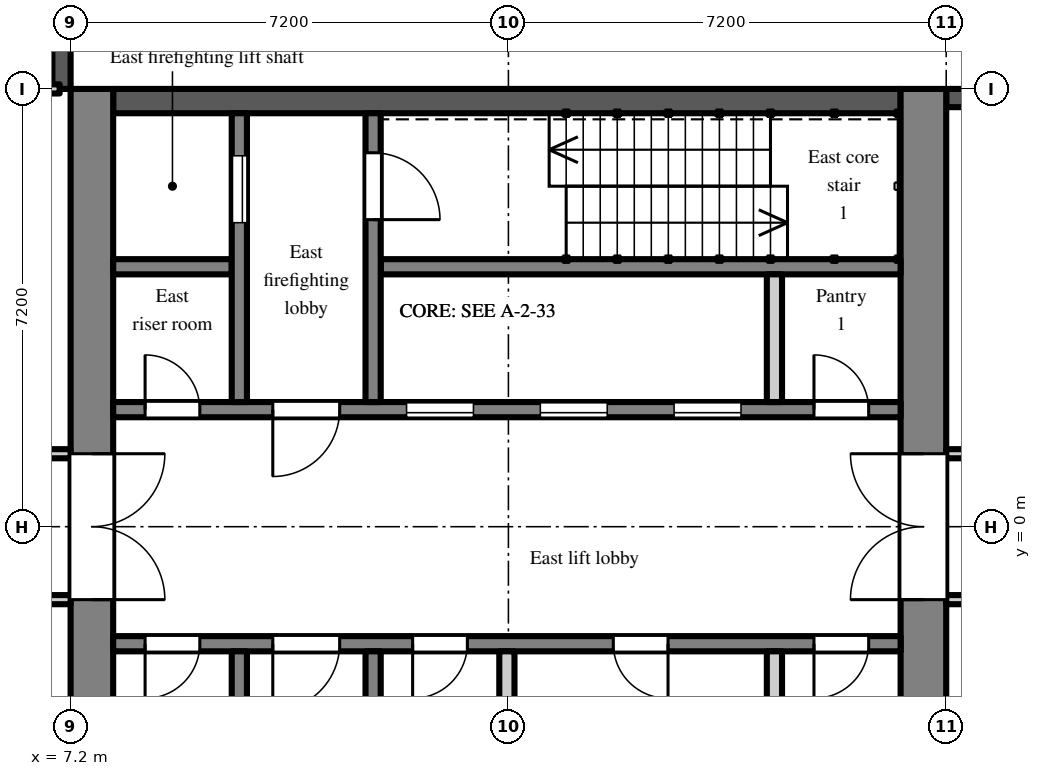
"""IFC4 building model, lengths in metres.
Left out: names, types, materials, properties, quantities, classifications, styles, units other than length and angle.
Written with IfcOpenShell. Run it as: python <this file> out.ifc"""

import sys

from ifc_helpers import new_model, si_unit, direction, frame, frame_2d, origin, place, context, subcontext, project, spatial, rectangle, extrude, element, fill, save


model = new_model("IFC4")
c1 = context("Model", 3, precision=1e-05, world=origin(), true_north=direction((0.0, 1.0)))
c2 = subcontext(c1, "Body", "Model", "MODEL_VIEW")
j1 = project(units=[si_unit("LENGTHUNIT", "METRE"), si_unit("PLANEANGLEUNIT", "RADIAN")], contexts=[c1])
p1 = place(None, origin())
s1 = spatial("IfcSite", under=j1, at=p1, CompositionType="ELEMENT")
p2 = place(p1, origin())
s2 = spatial("IfcBuilding", under=s1, at=p2, CompositionType="ELEMENT")
p3 = place(p2, frame((0.0, 0.0, 194.7)))
s3 = spatial("IfcBuildingStorey", under=s2, at=p3, CompositionType="ELEMENT", Elevation=194.7)
p4 = place(p3, frame((24.3, 7.05, 0.0), z_axis=(0.0, 0.0, 1.0), x_axis=(-1.0, 0.0, 0.0)))
e1 = element("IfcWall", 1, at=p4, inside=s3, PredefinedType="SOLIDWALL", context=c2, shape_type="SweptSolid", body=[
    extrude(rectangle(XDim=2.7, YDim=0.3, at=frame_2d((1.35, 0.0))), origin(), (0.0, 0.0, 1.0), 3.5),
])
p5 = place(p3, frame((7.05, 7.2, 0.0), z_axis=(0.0, 0.0, 1.0), x_axis=(0.0, 1.0, 0.0)))
e2 = element("IfcWall", 2, at=p5, inside=s3, PredefinedType="SOLIDWALL", context=c2, shape_type="SweptSolid", body=[
    extrude(rectangle(XDim=7.2, YDim=0.3, at=frame_2d((3.6, 0.0))), origin(), (0.0, 0.0, 1.0), 3.8),
])
p6 = place(p3, frame((7.55, -7.2, 0.0), z_axis=(0.0, 0.0, 1.0), x_axis=(0.0, 1.0, 0.0)))
e3 = element("IfcWall", 3, at=p6, inside=s3, PredefinedType="SHEAR", context=c2, shape_type="SweptSolid", body=[
    extrude(rectangle(XDim=14.4, YDim=0.7, at=frame_2d((7.2, 0.0))), origin(), (0.0, 0.0, 1.0), 3.8),
])
p7 = place(p6, frame((6.0, 0.0, 0.0)))
e4 = element("IfcOpeningElement", 4, at=p7, cuts=e3, PredefinedType="OPENING", context=c2, shape_type="SweptSolid", body=[
    extrude(rectangle(XDim=2.4, YDim=2.2, at=frame_2d((1.2, 1.1))), frame((0.0, 0.36, 0.0), z_axis=(0.0, -1.0, 0.0), x_axis=(1.0, 0.0, 0.0)), (0.0, 0.0, 1.0), 0.72),
])
p8 = place(p3, frame((21.225, -7.2, 0.0), z_axis=(0.0, 0.0, 1.0), x_axis=(0.0, 1.0, 0.0)))
e5 = element("IfcWall", 5, at=p8, inside=s3, PredefinedType="SHEAR", context=c2, shape_type="SweptSolid", body=[
    extrude(rectangle(XDim=14.4, YDim=0.75, at=frame_2d((7.2, 0.0))), origin(), (0.0, 0.0, 1.0), 3.8),
])
p9 = place(p8, frame((6.0, 0.0, 0.0)))
e6 = element("IfcOpeningElement", 6, at=p9, cuts=e5, PredefinedType="OPENING", context=c2, shape_type="SweptSolid", body=[
    extrude(rectangle(XDim=2.4, YDim=2.2, at=frame_2d((1.2, 1.1))), frame((0.0, 0.385, 0.0), z_axis=(0.0, -1.0, 0.0), x_axis=(1.0, 0.0, 0.0)), (0.0, 0.0, 1.0), 0.77),
])
p10 = place(p3, frame((7.9, 7.0, 0.0), z_axis=(0.0, 0.0, 1.0), x_axis=(1.0, 0.0, 0.0)))
e7 = element("IfcWall", 7, at=p10, inside=s3, PredefinedType="SHEAR", context=c2, shape_type="SweptSolid", body=[
    extrude(rectangle(XDim=12.95, YDim=0.4, at=frame_2d((6.475, 0.0))), origin(), (0.0, 0.0, 1.0), 3.8),
])
p11 = place(p3, frame((7.9, 1.925, 0.0), z_axis=(0.0, 0.0, 1.0), x_axis=(1.0, 0.0, 0.0)))
e8 = element("IfcWall", 8, at=p11, inside=s3, PredefinedType="SHEAR", context=c2, shape_type="SweptSolid", body=[
    extrude(rectangle(XDim=12.95, YDim=0.25, at=frame_2d((6.475, 0.0))), origin(), (0.0, 0.0, 1.0), 3.8),
])
p12 = place(p11, frame((4.825, 0.0, 0.0)))
e9 = element("IfcOpeningElement", 9, at=p12, cuts=e8, PredefinedType="OPENING", context=c2, shape_type="SweptSolid", body=[
    extrude(rectangle(XDim=1.1, YDim=2.1, at=frame_2d((0.55, 1.05))), frame((0.0, 0.135, 0.0), z_axis=(0.0, -1.0, 0.0), x_axis=(1.0, 0.0, 0.0)), (0.0, 0.0, 1.0), 0.27),
])
p13 = place(p11, frame((7.025, 0.0, 0.0)))
e10 = element("IfcOpeningElement", 10, at=p13, cuts=e8, PredefinedType="OPENING", context=c2, shape_type="SweptSolid", body=[
    extrude(rectangle(XDim=1.1, YDim=2.1, at=frame_2d((0.55, 1.05))), frame((0.0, 0.135, 0.0), z_axis=(0.0, -1.0, 0.0), x_axis=(1.0, 0.0, 0.0)), (0.0, 0.0, 1.0), 0.27),
])
p14 = place(p11, frame((9.225, 0.0, 0.0)))
e11 = element("IfcOpeningElement", 11, at=p14, cuts=e8, PredefinedType="OPENING", context=c2, shape_type="SweptSolid", body=[
    extrude(rectangle(XDim=1.1, YDim=2.1, at=frame_2d((0.55, 1.05))), frame((0.0, 0.135, 0.0), z_axis=(0.0, -1.0, 0.0), x_axis=(1.0, 0.0, 0.0)), (0.0, 0.0, 1.0), 0.27),
])
p15 = place(p11, frame((0.525, 0.0, 0.0)))
e12 = element("IfcOpeningElement", 12, at=p15, cuts=e8, PredefinedType="OPENING", context=c2, shape_type="SweptSolid", body=[
    extrude(rectangle(XDim=0.9, YDim=2.1, at=frame_2d((0.45, 1.05))), frame((0.0, 0.135, 0.0), z_axis=(0.0, -1.0, 0.0), x_axis=(1.0, 0.0, 0.0)), (0.0, 0.0, 1.0), 0.27),
])
p16 = place(p11, frame((2.625, 0.0, 0.0)))
e13 = element("IfcOpeningElement", 13, at=p16, cuts=e8, PredefinedType="OPENING", context=c2, shape_type="SweptSolid", body=[
    extrude(rectangle(XDim=1.1, YDim=2.1, at=frame_2d((0.55, 1.05))), frame((0.0, 0.135, 0.0), z_axis=(0.0, -1.0, 0.0), x_axis=(1.0, 0.0, 0.0)), (0.0, 0.0, 1.0), 0.27),
])
p17 = place(p11, frame((11.525, 0.0, 0.0)))
e14 = element("IfcOpeningElement", 14, at=p17, cuts=e8, PredefinedType="OPENING", context=c2, shape_type="SweptSolid", body=[
    extrude(rectangle(XDim=0.9, YDim=2.1, at=frame_2d((0.45, 1.05))), frame((0.0, 0.135, 0.0), z_axis=(0.0, -1.0, 0.0), x_axis=(1.0, 0.0, 0.0)), (0.0, 0.0, 1.0), 0.27),
])
p18 = place(p3, frame((7.9, 4.275, 0.0), z_axis=(0.0, 0.0, 1.0), x_axis=(1.0, 0.0, 0.0)))
e15 = element("IfcWall", 15, at=p18, inside=s3, PredefinedType="SHEAR", context=c2, shape_type="SweptSolid", body=[
    extrude(rectangle(XDim=1.95, YDim=0.25, at=frame_2d((0.975, 0.0))), origin(), (0.0, 0.0, 1.0), 3.8),
])
p19 = place(p3, frame((12.3, 4.275, 0.0), z_axis=(0.0, 0.0, 1.0), x_axis=(1.0, 0.0, 0.0)))
e16 = element("IfcWall", 16, at=p19, inside=s3, PredefinedType="SHEAR", context=c2, shape_type="SweptSolid", body=[
    extrude(rectangle(XDim=8.55, YDim=0.25, at=frame_2d((4.275, 0.0))), origin(), (0.0, 0.0, 1.0), 3.8),
])
p20 = place(p3, frame((9.975, 2.05, 0.0), z_axis=(0.0, 0.0, 1.0), x_axis=(0.0, 1.0, 0.0)))
e17 = element("IfcWall", 17, at=p20, inside=s3, PredefinedType="SHEAR", context=c2, shape_type="SweptSolid", body=[
    extrude(rectangle(XDim=4.75, YDim=0.25, at=frame_2d((2.375, 0.0))), origin(), (0.0, 0.0, 1.0), 3.8),
])
p21 = place(p20, frame((2.95, 0.0, 0.0)))
e18 = element("IfcOpeningElement", 18, at=p21, cuts=e17, PredefinedType="OPENING", context=c2, shape_type="SweptSolid", body=[
    extrude(rectangle(XDim=1.1, YDim=2.1, at=frame_2d((0.55, 1.05))), frame((0.0, 0.135, 0.0), z_axis=(0.0, -1.0, 0.0), x_axis=(1.0, 0.0, 0.0)), (0.0, 0.0, 1.0), 0.27),
])
p22 = place(p3, frame((12.175, 2.05, 0.0), z_axis=(0.0, 0.0, 1.0), x_axis=(0.0, 1.0, 0.0)))
e19 = element("IfcWall", 19, at=p22, inside=s3, PredefinedType="SHEAR", context=c2, shape_type="SweptSolid", body=[
    extrude(rectangle(XDim=4.75, YDim=0.25, at=frame_2d((2.375, 0.0))), origin(), (0.0, 0.0, 1.0), 3.8),
])
p23 = place(p22, frame((3.0, 0.0, 0.0)))
e20 = element("IfcOpeningElement", 20, at=p23, cuts=e19, PredefinedType="OPENING", context=c2, shape_type="SweptSolid", body=[
    extrude(rectangle(XDim=1.1, YDim=2.1, at=frame_2d((0.55, 1.05))), frame((0.0, 0.135, 0.0), z_axis=(0.0, -1.0, 0.0), x_axis=(1.0, 0.0, 0.0)), (0.0, 0.0, 1.0), 0.27),
])
p24 = place(p3, frame((18.775, 2.05, 0.0), z_axis=(0.0, 0.0, 1.0), x_axis=(0.0, 1.0, 0.0)))
e21 = element("IfcWall", 21, at=p24, inside=s3, PredefinedType="PARTITIONING", context=c2, shape_type="SweptSolid", body=[
    extrude(rectangle(XDim=2.1, YDim=0.25, at=frame_2d((1.05, 0.0))), origin(), (0.0, 0.0, 1.0), 3.8),
])
p25 = place(p3, frame((7.9, -1.925, 0.0), z_axis=(0.0, 0.0, 1.0), x_axis=(1.0, 0.0, 0.0)))
e22 = element("IfcWall", 22, at=p25, inside=s3, PredefinedType="SHEAR", context=c2, shape_type="SweptSolid", body=[
    extrude(rectangle(XDim=12.95, YDim=0.25, at=frame_2d((6.475, 0.0))), origin(), (0.0, 0.0, 1.0), 3.8),
])
p26 = place(p25, frame((0.525, 0.0, 0.0)))
e23 = element("IfcOpeningElement", 23, at=p26, cuts=e22, PredefinedType="OPENING", context=c2, shape_type="SweptSolid", body=[
    extrude(rectangle(XDim=0.9, YDim=2.1, at=frame_2d((0.45, 1.05))), frame((0.0, 0.135, 0.0), z_axis=(0.0, -1.0, 0.0), x_axis=(1.0, 0.0, 0.0)), (0.0, 0.0, 1.0), 0.27),
])
p27 = place(p25, frame((2.625, 0.0, 0.0)))
e24 = element("IfcOpeningElement", 24, at=p27, cuts=e22, PredefinedType="OPENING", context=c2, shape_type="SweptSolid", body=[
    extrude(rectangle(XDim=1.1, YDim=2.1, at=frame_2d((0.55, 1.05))), frame((0.0, 0.135, 0.0), z_axis=(0.0, -1.0, 0.0), x_axis=(1.0, 0.0, 0.0)), (0.0, 0.0, 1.0), 0.27),
])
p28 = place(p25, frame((4.925, 0.0, 0.0)))
e25 = element("IfcOpeningElement", 25, at=p28, cuts=e22, PredefinedType="OPENING", context=c2, shape_type="SweptSolid", body=[
    extrude(rectangle(XDim=0.9, YDim=2.1, at=frame_2d((0.45, 1.05))), frame((0.0, 0.135, 0.0), z_axis=(0.0, -1.0, 0.0), x_axis=(1.0, 0.0, 0.0)), (0.0, 0.0, 1.0), 0.27),
])
p29 = place(p25, frame((8.225, 0.0, 0.0)))
e26 = element("IfcOpeningElement", 26, at=p29, cuts=e22, PredefinedType="OPENING", context=c2, shape_type="SweptSolid", body=[
    extrude(rectangle(XDim=0.9, YDim=2.1, at=frame_2d((0.45, 1.05))), frame((0.0, 0.135, 0.0), z_axis=(0.0, -1.0, 0.0), x_axis=(1.0, 0.0, 0.0)), (0.0, 0.0, 1.0), 0.27),
])
p30 = place(p25, frame((11.525, 0.0, 0.0)))
e27 = element("IfcOpeningElement", 27, at=p30, cuts=e22, PredefinedType="OPENING", context=c2, shape_type="SweptSolid", body=[
    extrude(rectangle(XDim=0.9, YDim=2.1, at=frame_2d((0.45, 1.05))), frame((0.0, 0.135, 0.0), z_axis=(0.0, -1.0, 0.0), x_axis=(1.0, 0.0, 0.0)), (0.0, 0.0, 1.0), 0.27),
])
p31 = place(p3, frame((9.975, -2.05, 0.0), z_axis=(0.0, 0.0, 1.0), x_axis=(0.0, -1.0, 0.0)))
e28 = element("IfcWall", 28, at=p31, inside=s3, PredefinedType="SHEAR", context=c2, shape_type="SweptSolid", body=[
    extrude(rectangle(XDim=4.75, YDim=0.25, at=frame_2d((2.375, 0.0))), origin(), (0.0, 0.0, 1.0), 3.8),
])
p32 = place(p31, frame((2.95, 0.0, 0.0)))
e29 = element("IfcOpeningElement", 29, at=p32, cuts=e28, PredefinedType="OPENING", context=c2, shape_type="SweptSolid", body=[
    extrude(rectangle(XDim=1.1, YDim=2.1, at=frame_2d((0.55, 1.05))), frame((0.0, 0.135, 0.0), z_axis=(0.0, -1.0, 0.0), x_axis=(1.0, 0.0, 0.0)), (0.0, 0.0, 1.0), 0.27),
])
p33 = place(p3, frame((12.175, -2.05, 0.0), z_axis=(0.0, 0.0, 1.0), x_axis=(0.0, -1.0, 0.0)))
e30 = element("IfcWall", 30, at=p33, inside=s3, PredefinedType="SHEAR", context=c2, shape_type="SweptSolid", body=[
    extrude(rectangle(XDim=4.75, YDim=0.25, at=frame_2d((2.375, 0.0))), origin(), (0.0, 0.0, 1.0), 3.8),
])
p34 = place(p33, frame((3.0, 0.0, 0.0)))
e31 = element("IfcOpeningElement", 31, at=p34, cuts=e30, PredefinedType="OPENING", context=c2, shape_type="SweptSolid", body=[
    extrude(rectangle(XDim=1.1, YDim=2.1, at=frame_2d((0.55, 1.05))), frame((0.0, 0.135, 0.0), z_axis=(0.0, -1.0, 0.0), x_axis=(1.0, 0.0, 0.0)), (0.0, 0.0, 1.0), 0.27),
])
for number, where, z_axis, x_axis in (
    (32, (14.375, -2.05, 0.0), (0.0, 0.0, 1.0), (0.0, -1.0, 0.0)),
    (33, (18.775, -2.05, 0.0), (0.0, 0.0, 1.0), (0.0, -1.0, 0.0)),
):
    element("IfcWall", number, at=place(p3, frame(where, z_axis=z_axis, x_axis=x_axis)), inside=s3, PredefinedType="PARTITIONING", context=c2, shape_type="SweptSolid", body=[
        extrude(rectangle(XDim=2.1, YDim=0.25, at=frame_2d((1.05, 0.0))), origin(), (0.0, 0.0, 1.0), 3.8),
    ])
p35 = place(p3, frame((1.275, -1.2, 0.0), z_axis=(0.0, 0.0, 1.0), x_axis=(1.0, 0.0, 0.0)))
e34 = element("IfcWall", 34, at=p35, inside=s3, PredefinedType="PARTITIONING", context=c2, shape_type="SweptSolid", body=[
    extrude(rectangle(XDim=5.925, YDim=0.15, at=frame_2d((2.962, 0.0))), origin(), (0.0, 0.0, 1.0), 3.8),
])
p36 = place(p35, frame((0.1, 0.0, 0.0)))
e35 = element("IfcOpeningElement", 35, at=p36, cuts=e34, PredefinedType="OPENING", context=c2, shape_type="SweptSolid", body=[
    extrude(rectangle(XDim=0.9, YDim=2.1, at=frame_2d((0.45, 1.05))), frame((0.0, 0.085, 0.0), z_axis=(0.0, -1.0, 0.0), x_axis=(1.0, 0.0, 0.0)), (0.0, 0.0, 1.0), 0.17),
])
p37 = place(p35, frame((4.075, 0.0, 0.0)))
e36 = element("IfcOpeningElement", 36, at=p37, cuts=e34, PredefinedType="OPENING", context=c2, shape_type="SweptSolid", body=[
    extrude(rectangle(XDim=1.2, YDim=2.1, at=frame_2d((0.6, 1.05))), frame((0.0, 0.085, 0.0), z_axis=(0.0, -1.0, 0.0), x_axis=(1.0, 0.0, 0.0)), (0.0, 0.0, 1.0), 0.17),
])
p38 = place(p3, frame((1.275, 1.2, 0.0), z_axis=(0.0, 0.0, 1.0), x_axis=(1.0, 0.0, 0.0)))
e37 = element("IfcWall", 37, at=p38, inside=s3, PredefinedType="PARTITIONING", context=c2, shape_type="SweptSolid", body=[
    extrude(rectangle(XDim=5.925, YDim=0.15, at=frame_2d((2.962, 0.0))), origin(), (0.0, 0.0, 1.0), 3.8),
])
p39 = place(p38, frame((3.875, 0.0, 0.0)))
e38 = element("IfcOpeningElement", 38, at=p39, cuts=e37, PredefinedType="OPENING", context=c2, shape_type="SweptSolid", body=[
    extrude(rectangle(XDim=1.2, YDim=2.1, at=frame_2d((0.6, 1.05))), frame((0.0, 0.085, 0.0), z_axis=(0.0, -1.0, 0.0), x_axis=(1.0, 0.0, 0.0)), (0.0, 0.0, 1.0), 0.17),
])
p40 = place(p3, frame((21.6, -1.2, 0.0), z_axis=(0.0, 0.0, 1.0), x_axis=(1.0, 0.0, 0.0)))
e39 = element("IfcWall", 39, at=p40, inside=s3, PredefinedType="PARTITIONING", context=c2, shape_type="SweptSolid", body=[
    extrude(rectangle(XDim=7.02, YDim=0.15, at=frame_2d((3.51, 0.0))), origin(), (0.0, 0.0, 1.0), 3.8),
])
p41 = place(p40, frame((0.65, 0.0, 0.0)))
e40 = element("IfcOpeningElement", 40, at=p41, cuts=e39, PredefinedType="OPENING", context=c2, shape_type="SweptSolid", body=[
    extrude(rectangle(XDim=1.2, YDim=2.1, at=frame_2d((0.6, 1.05))), frame((0.0, 0.085, 0.0), z_axis=(0.0, -1.0, 0.0), x_axis=(1.0, 0.0, 0.0)), (0.0, 0.0, 1.0), 0.17),
])
p42 = place(p40, frame((4.25, 0.0, 0.0)))
e41 = element("IfcOpeningElement", 41, at=p42, cuts=e39, PredefinedType="OPENING", context=c2, shape_type="SweptSolid", body=[
    extrude(rectangle(XDim=1.8, YDim=2.1, at=frame_2d((0.9, 1.05))), frame((0.0, 0.085, 0.0), z_axis=(0.0, -1.0, 0.0), x_axis=(1.0, 0.0, 0.0)), (0.0, 0.0, 1.0), 0.17),
])
p43 = place(p3, frame((21.6, 1.2, 0.0), z_axis=(0.0, 0.0, 1.0), x_axis=(1.0, 0.0, 0.0)))
e42 = element("IfcWall", 42, at=p43, inside=s3, PredefinedType="PARTITIONING", context=c2, shape_type="SweptSolid", body=[
    extrude(rectangle(XDim=7.02, YDim=0.15, at=frame_2d((3.51, 0.0))), origin(), (0.0, 0.0, 1.0), 3.8),
])
p44 = place(p43, frame((1.1, 0.0, 0.0)))
e43 = element("IfcOpeningElement", 43, at=p44, cuts=e42, PredefinedType="OPENING", context=c2, shape_type="SweptSolid", body=[
    extrude(rectangle(XDim=1.2, YDim=2.1, at=frame_2d((0.6, 1.05))), frame((0.0, 0.085, 0.0), z_axis=(0.0, -1.0, 0.0), x_axis=(1.0, 0.0, 0.0)), (0.0, 0.0, 1.0), 0.17),
])
p45 = place(p43, frame((4.95, 0.0, 0.0)))
e44 = element("IfcOpeningElement", 44, at=p45, cuts=e42, PredefinedType="OPENING", context=c2, shape_type="SweptSolid", body=[
    extrude(rectangle(XDim=0.9, YDim=2.1, at=frame_2d((0.45, 1.05))), frame((0.0, 0.085, 0.0), z_axis=(0.0, -1.0, 0.0), x_axis=(1.0, 0.0, 0.0)), (0.0, 0.0, 1.0), 0.17),
])
p46 = place(p3, frame((3.75, 7.2, 0.0), z_axis=(0.0, 0.0, 1.0), x_axis=(1.0, 0.0, 0.0)))
e45 = element("IfcWall", 45, at=p46, inside=s3, PredefinedType="PARTITIONING", context=c2, shape_type="SweptSolid", body=[
    extrude(rectangle(XDim=3.27, YDim=0.15, at=frame_2d((1.635, 0.0))), origin(), (0.0, 0.0, 1.0), 3.5),
])
p47 = place(p12, origin())
e46 = element("IfcDoor", 46, at=p47, inside=s3, OperationType="SLIDING_TO_LEFT", PredefinedType="DOOR", context=c2, shape_type="SweptSolid", body=[
    extrude(rectangle(XDim=1.1, YDim=2.1, at=frame_2d((0.55, 1.05))), frame((0.0, 0.025, 0.0), z_axis=(0.0, -1.0, 0.0), x_axis=(1.0, 0.0, 0.0)), (0.0, 0.0, 1.0), 0.05),
])
fill(e9, e46)
p48 = place(p13, origin())
e47 = element("IfcDoor", 47, at=p48, inside=s3, OperationType="SLIDING_TO_LEFT", PredefinedType="DOOR", context=c2, shape_type="SweptSolid", body=[
    extrude(rectangle(XDim=1.1, YDim=2.1, at=frame_2d((0.55, 1.05))), frame((0.0, 0.025, 0.0), z_axis=(0.0, -1.0, 0.0), x_axis=(1.0, 0.0, 0.0)), (0.0, 0.0, 1.0), 0.05),
])
fill(e10, e47)
p49 = place(p14, origin())
e48 = element("IfcDoor", 48, at=p49, inside=s3, OperationType="SLIDING_TO_LEFT", PredefinedType="DOOR", context=c2, shape_type="SweptSolid", body=[
    extrude(rectangle(XDim=1.1, YDim=2.1, at=frame_2d((0.55, 1.05))), frame((0.0, 0.025, 0.0), z_axis=(0.0, -1.0, 0.0), x_axis=(1.0, 0.0, 0.0)), (0.0, 0.0, 1.0), 0.05),
])
fill(e11, e48)
p50 = place(p21, origin())
e49 = element("IfcDoor", 49, at=p50, inside=s3, OperationType="SLIDING_TO_LEFT", PredefinedType="DOOR", context=c2, shape_type="SweptSolid", body=[
    extrude(rectangle(XDim=1.1, YDim=2.1, at=frame_2d((0.55, 1.05))), frame((0.0, 0.025, 0.0), z_axis=(0.0, -1.0, 0.0), x_axis=(1.0, 0.0, 0.0)), (0.0, 0.0, 1.0), 0.05),
])
fill(e18, e49)
p51 = place(p23, frame((1.1, 0.0, 0.0), z_axis=(0.0, 0.0, 1.0), x_axis=(-1.0, 0.0, 0.0)))
e50 = element("IfcDoor", 50, at=p51, inside=s3, OperationType="SINGLE_SWING_RIGHT", PredefinedType="DOOR", context=c2, shape_type="SweptSolid", body=[
    extrude(rectangle(XDim=1.1, YDim=2.1, at=frame_2d((0.55, 1.05))), frame((0.0, 0.025, 0.0), z_axis=(0.0, -1.0, 0.0), x_axis=(1.0, 0.0, 0.0)), (0.0, 0.0, 1.0), 0.05),
])
fill(e20, e50)
p52 = place(p15, origin())
e51 = element("IfcDoor", 51, at=p52, inside=s3, OperationType="SINGLE_SWING_LEFT", PredefinedType="DOOR", context=c2, shape_type="SweptSolid", body=[
    extrude(rectangle(XDim=0.9, YDim=2.1, at=frame_2d((0.45, 1.05))), frame((0.0, 0.025, 0.0), z_axis=(0.0, -1.0, 0.0), x_axis=(1.0, 0.0, 0.0)), (0.0, 0.0, 1.0), 0.05),
])
fill(e12, e51)
p53 = place(p26, frame((0.9, 0.0, 0.0), z_axis=(0.0, 0.0, 1.0), x_axis=(-1.0, 0.0, 0.0)))
e52 = element("IfcDoor", 52, at=p53, inside=s3, OperationType="SINGLE_SWING_RIGHT", PredefinedType="DOOR", context=c2, shape_type="SweptSolid", body=[
    extrude(rectangle(XDim=0.9, YDim=2.1, at=frame_2d((0.45, 1.05))), frame((0.0, 0.025, 0.0), z_axis=(0.0, -1.0, 0.0), x_axis=(1.0, 0.0, 0.0)), (0.0, 0.0, 1.0), 0.05),
])
fill(e23, e52)
p54 = place(p16, frame((1.1, 0.0, 0.0), z_axis=(0.0, 0.0, 1.0), x_axis=(-1.0, 0.0, 0.0)))
e53 = element("IfcDoor", 53, at=p54, inside=s3, OperationType="SINGLE_SWING_RIGHT", PredefinedType="DOOR", context=c2, shape_type="SweptSolid", body=[
    extrude(rectangle(XDim=1.1, YDim=2.1, at=frame_2d((0.55, 1.05))), frame((0.0, 0.025, 0.0), z_axis=(0.0, -1.0, 0.0), x_axis=(1.0, 0.0, 0.0)), (0.0, 0.0, 1.0), 0.05),
])
fill(e13, e53)
p55 = place(p27, frame((1.1, 0.0, 0.0), z_axis=(0.0, 0.0, 1.0), x_axis=(-1.0, 0.0, 0.0)))
e54 = element("IfcDoor", 54, at=p55, inside=s3, OperationType="SINGLE_SWING_RIGHT", PredefinedType="DOOR", context=c2, shape_type="SweptSolid", body=[
    extrude(rectangle(XDim=1.1, YDim=2.1, at=frame_2d((0.55, 1.05))), frame((0.0, 0.025, 0.0), z_axis=(0.0, -1.0, 0.0), x_axis=(1.0, 0.0, 0.0)), (0.0, 0.0, 1.0), 0.05),
])
fill(e24, e54)
p56 = place(p7, frame((2.4, 0.0, 0.0), z_axis=(0.0, 0.0, 1.0), x_axis=(-1.0, 0.0, 0.0)))
e55 = element("IfcDoor", 55, at=p56, inside=s3, OperationType="DOUBLE_DOOR_DOUBLE_SWING", PredefinedType="DOOR", context=c2, shape_type="SweptSolid", body=[
    extrude(rectangle(XDim=2.4, YDim=2.2, at=frame_2d((1.2, 1.1))), frame((0.0, 0.025, 0.0), z_axis=(0.0, -1.0, 0.0), x_axis=(1.0, 0.0, 0.0)), (0.0, 0.0, 1.0), 0.05),
])
fill(e4, e55)
p57 = place(p9, origin())
e56 = element("IfcDoor", 56, at=p57, inside=s3, OperationType="DOUBLE_DOOR_DOUBLE_SWING", PredefinedType="DOOR", context=c2, shape_type="SweptSolid", body=[
    extrude(rectangle(XDim=2.4, YDim=2.2, at=frame_2d((1.2, 1.1))), frame((0.0, 0.025, 0.0), z_axis=(0.0, -1.0, 0.0), x_axis=(1.0, 0.0, 0.0)), (0.0, 0.0, 1.0), 0.05),
])
fill(e6, e56)
p58 = place(p17, origin())
e57 = element("IfcDoor", 57, at=p58, inside=s3, OperationType="SINGLE_SWING_LEFT", PredefinedType="DOOR", context=c2, shape_type="SweptSolid", body=[
    extrude(rectangle(XDim=0.9, YDim=2.1, at=frame_2d((0.45, 1.05))), frame((0.0, 0.025, 0.0), z_axis=(0.0, -1.0, 0.0), x_axis=(1.0, 0.0, 0.0)), (0.0, 0.0, 1.0), 0.05),
])
fill(e14, e57)
p59 = place(p28, frame((0.9, 0.0, 0.0), z_axis=(0.0, 0.0, 1.0), x_axis=(-1.0, 0.0, 0.0)))
e58 = element("IfcDoor", 58, at=p59, inside=s3, OperationType="SINGLE_SWING_RIGHT", PredefinedType="DOOR", context=c2, shape_type="SweptSolid", body=[
    extrude(rectangle(XDim=0.9, YDim=2.1, at=frame_2d((0.45, 1.05))), frame((0.0, 0.025, 0.0), z_axis=(0.0, -1.0, 0.0), x_axis=(1.0, 0.0, 0.0)), (0.0, 0.0, 1.0), 0.05),
])
fill(e25, e58)
p60 = place(p29, frame((0.9, 0.0, 0.0), z_axis=(0.0, 0.0, 1.0), x_axis=(-1.0, 0.0, 0.0)))
e59 = element("IfcDoor", 59, at=p60, inside=s3, OperationType="SINGLE_SWING_LEFT", PredefinedType="DOOR", context=c2, shape_type="SweptSolid", body=[
    extrude(rectangle(XDim=0.9, YDim=2.1, at=frame_2d((0.45, 1.05))), frame((0.0, 0.025, 0.0), z_axis=(0.0, -1.0, 0.0), x_axis=(1.0, 0.0, 0.0)), (0.0, 0.0, 1.0), 0.05),
])
fill(e26, e59)
p61 = place(p30, frame((0.9, 0.0, 0.0), z_axis=(0.0, 0.0, 1.0), x_axis=(-1.0, 0.0, 0.0)))
e60 = element("IfcDoor", 60, at=p61, inside=s3, OperationType="SINGLE_SWING_RIGHT", PredefinedType="DOOR", context=c2, shape_type="SweptSolid", body=[
    extrude(rectangle(XDim=0.9, YDim=2.1, at=frame_2d((0.45, 1.05))), frame((0.0, 0.025, 0.0), z_axis=(0.0, -1.0, 0.0), x_axis=(1.0, 0.0, 0.0)), (0.0, 0.0, 1.0), 0.05),
])
fill(e27, e60)
save(model, sys.argv[1])
